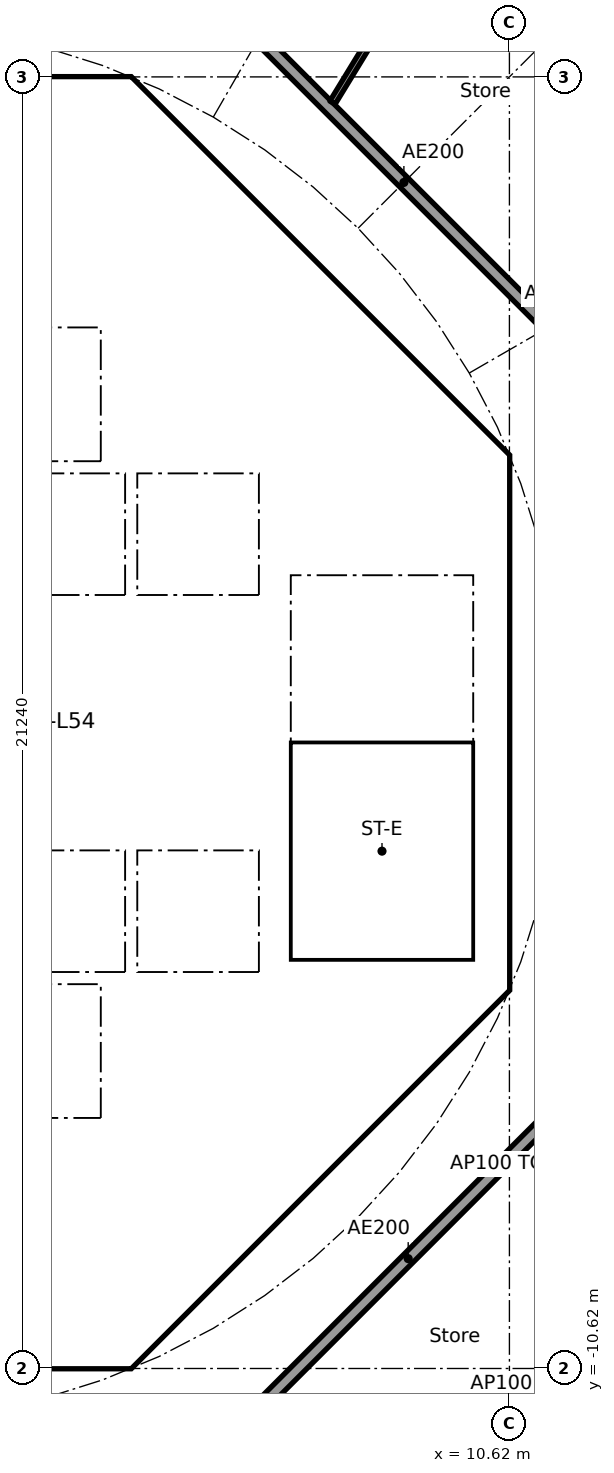
"""IFC4 building model, lengths in metres.
Left out: names, types, materials, properties, quantities, classifications, styles, units other than length and angle.
Written with IfcOpenShell. Run it as: python <this file> out.ifc"""

import sys

from ifc_helpers import new_model, si_unit, direction, frame, frame_2d, origin, place, context, subcontext, project, spatial, polyline, rectangle, outline, extrude, element, fill, save


model = new_model("IFC4")
c1 = context("Model", 3, precision=1e-05, world=origin(), true_north=direction((0.0, 1.0)))
c2 = subcontext(c1, "Body", "Model", "MODEL_VIEW")
j1 = project(units=[si_unit("LENGTHUNIT", "METRE"), si_unit("PLANEANGLEUNIT", "RADIAN")], contexts=[c1])
p1 = place(None, origin())
s1 = spatial("IfcSite", under=j1, at=p1, CompositionType="ELEMENT")
p2 = place(p1, origin())
s2 = spatial("IfcBuilding", under=s1, at=p2, CompositionType="ELEMENT")
p3 = place(p2, frame((0.0, 0.0, 212.2)))
s3 = spatial("IfcBuildingStorey", under=s2, at=p3, CompositionType="ELEMENT", Elevation=212.2)
p4 = place(p3, frame((9.988, 4.613, 0.0), z_axis=(0.0, 0.0, 1.0), x_axis=(-0.707106781187, 0.707106781187, 0.0)))
e1 = element("IfcWall", 1, at=p4, inside=s3, PredefinedType="SHEAR", context=c2, shape_type="SweptSolid", body=[
    extrude(rectangle(XDim=7.602, YDim=0.6, at=frame_2d((3.801, 0.0))), origin(), (0.0, 0.0, 1.0), 3.44),
])
p5 = place(p4, frame((3.201, 0.0, 0.0)))
e2 = element("IfcOpeningElement", 2, at=p5, cuts=e1, PredefinedType="OPENING", context=c2, shape_type="SweptSolid", body=[
    extrude(rectangle(XDim=1.2, YDim=2.1, at=frame_2d((0.6, 1.05))), frame((0.0, 0.31, 0.0), z_axis=(0.0, -1.0, 0.0), x_axis=(1.0, 0.0, 0.0)), (0.0, 0.0, 1.0), 0.62),
])
p6 = place(p3, frame((4.613, -9.988, 0.0), z_axis=(0.0, 0.0, 1.0), x_axis=(0.707106781187, 0.707106781187, 0.0)))
e3 = element("IfcWall", 3, at=p6, inside=s3, PredefinedType="SHEAR", context=c2, shape_type="SweptSolid", body=[
    extrude(rectangle(XDim=7.602, YDim=0.6, at=frame_2d((3.801, 0.0))), origin(), (0.0, 0.0, 1.0), 3.44),
])
p7 = place(p6, frame((3.201, 0.0, 0.0)))
e4 = element("IfcOpeningElement", 4, at=p7, cuts=e3, PredefinedType="OPENING", context=c2, shape_type="SweptSolid", body=[
    extrude(rectangle(XDim=1.2, YDim=2.1, at=frame_2d((0.6, 1.05))), frame((0.0, 0.31, 0.0), z_axis=(0.0, -1.0, 0.0), x_axis=(1.0, 0.0, 0.0)), (0.0, 0.0, 1.0), 0.62),
])
p8 = place(p3, frame((4.0, 4.3, 0.0), z_axis=(0.0, 0.0, 1.0), x_axis=(0.0, 1.0, 0.0)))
e5 = element("IfcWall", 5, at=p8, inside=s3, PredefinedType="SOLIDWALL", context=c2, shape_type="SweptSolid", body=[
    extrude(rectangle(XDim=2.2, YDim=0.2, at=frame_2d((1.1, 0.0))), origin(), (0.0, 0.0, 1.0), 3.44),
])
p9 = place(p8, frame((0.55, 0.0, 0.0)))
e6 = element("IfcOpeningElement", 6, at=p9, cuts=e5, PredefinedType="OPENING", context=c2, shape_type="SweptSolid", body=[
    extrude(rectangle(XDim=1.1, YDim=2.1, at=frame_2d((0.55, 1.05))), frame((0.0, 0.11, 0.0), z_axis=(0.0, -1.0, 0.0), x_axis=(1.0, 0.0, 0.0)), (0.0, 0.0, 1.0), 0.22),
])
p10 = place(p3, frame((-6.7, 2.0, 0.0), z_axis=(0.0, 0.0, 1.0), x_axis=(1.0, 0.0, 0.0)))
e7 = element("IfcWall", 7, at=p10, inside=s3, PredefinedType="SOLIDWALL", context=c2, shape_type="SweptSolid", body=[
    extrude(rectangle(XDim=13.4, YDim=0.2, at=frame_2d((6.7, 0.0))), origin(), (0.0, 0.0, 1.0), 3.44),
])
p11 = place(p10, frame((7.25, 0.0, 0.0)))
e8 = element("IfcOpeningElement", 8, at=p11, cuts=e7, PredefinedType="OPENING", context=c2, shape_type="SweptSolid", body=[
    extrude(rectangle(XDim=1.1, YDim=2.1, at=frame_2d((0.55, 1.05))), frame((0.0, 0.11, 0.0), z_axis=(0.0, -1.0, 0.0), x_axis=(1.0, 0.0, 0.0)), (0.0, 0.0, 1.0), 0.22),
])
p12 = place(p10, frame((9.45, 0.0, 0.0)))
e9 = element("IfcOpeningElement", 9, at=p12, cuts=e7, PredefinedType="OPENING", context=c2, shape_type="SweptSolid", body=[
    extrude(rectangle(XDim=1.1, YDim=2.1, at=frame_2d((0.55, 1.05))), frame((0.0, 0.11, 0.0), z_axis=(0.0, -1.0, 0.0), x_axis=(1.0, 0.0, 0.0)), (0.0, 0.0, 1.0), 0.22),
])
p13 = place(p10, frame((0.75, 0.0, 0.0)))
e10 = element("IfcOpeningElement", 10, at=p13, cuts=e7, PredefinedType="OPENING", context=c2, shape_type="SweptSolid", body=[
    extrude(rectangle(XDim=0.9, YDim=2.1, at=frame_2d((0.45, 1.05))), frame((0.0, 0.11, 0.0), z_axis=(0.0, -1.0, 0.0), x_axis=(1.0, 0.0, 0.0)), (0.0, 0.0, 1.0), 0.22),
])
p14 = place(p10, frame((4.05, 0.0, 0.0)))
e11 = element("IfcOpeningElement", 11, at=p14, cuts=e7, PredefinedType="OPENING", context=c2, shape_type="SweptSolid", body=[
    extrude(rectangle(XDim=0.9, YDim=2.1, at=frame_2d((0.45, 1.05))), frame((0.0, 0.11, 0.0), z_axis=(0.0, -1.0, 0.0), x_axis=(1.0, 0.0, 0.0)), (0.0, 0.0, 1.0), 0.22),
])
p15 = place(p3, frame((6.7, 4.0, 0.0), z_axis=(0.0, 0.0, 1.0), x_axis=(1.0, 0.0, 0.0)))
e12 = element("IfcWall", 12, at=p15, inside=s3, PredefinedType="SOLIDWALL", context=c2, shape_type="SweptSolid", body=[
    extrude(rectangle(XDim=3.325, YDim=0.2, at=frame_2d((1.662, 0.0))), origin(), (0.0, 0.0, 1.0), 3.44),
])
p16 = place(p15, frame((1.25, 0.0, 0.0)))
e13 = element("IfcOpeningElement", 13, at=p16, cuts=e12, PredefinedType="OPENING", context=c2, shape_type="SweptSolid", body=[
    extrude(rectangle(XDim=1.1, YDim=2.1, at=frame_2d((0.55, 1.05))), frame((0.0, 0.11, 0.0), z_axis=(0.0, -1.0, 0.0), x_axis=(1.0, 0.0, 0.0)), (0.0, 0.0, 1.0), 0.22),
])
p17 = place(p3, frame((4.0, 7.025, 0.0), z_axis=(0.0, 0.0, 1.0), x_axis=(0.0, 1.0, 0.0)))
e14 = element("IfcWall", 14, at=p17, inside=s3, PredefinedType="SOLIDWALL", context=c2, shape_type="SweptSolid", body=[
    extrude(rectangle(XDim=3.0, YDim=0.2, at=frame_2d((1.5, 0.0))), origin(), (0.0, 0.0, 1.0), 3.44),
])
p18 = place(p17, frame((0.925, 0.0, 0.0)))
e15 = element("IfcOpeningElement", 15, at=p18, cuts=e14, PredefinedType="OPENING", context=c2, shape_type="SweptSolid", body=[
    extrude(rectangle(XDim=1.1, YDim=2.1, at=frame_2d((0.55, 1.05))), frame((0.0, 0.11, 0.0), z_axis=(0.0, -1.0, 0.0), x_axis=(1.0, 0.0, 0.0)), (0.0, 0.0, 1.0), 0.22),
])
p19 = place(p3, frame((4.0, -10.025, 0.0), z_axis=(0.0, 0.0, 1.0), x_axis=(0.0, 1.0, 0.0)))
e16 = element("IfcWall", 16, at=p19, inside=s3, PredefinedType="SOLIDWALL", context=c2, shape_type="SweptSolid", body=[
    extrude(rectangle(XDim=3.0, YDim=0.2, at=frame_2d((1.5, 0.0))), origin(), (0.0, 0.0, 1.0), 3.44),
])
p20 = place(p19, frame((0.975, 0.0, 0.0)))
e17 = element("IfcOpeningElement", 17, at=p20, cuts=e16, PredefinedType="OPENING", context=c2, shape_type="SweptSolid", body=[
    extrude(rectangle(XDim=1.1, YDim=2.1, at=frame_2d((0.55, 1.05))), frame((0.0, 0.11, 0.0), z_axis=(0.0, -1.0, 0.0), x_axis=(1.0, 0.0, 0.0)), (0.0, 0.0, 1.0), 0.22),
])
p21 = place(p3, frame((4.0, -6.5, 0.0), z_axis=(0.0, 0.0, 1.0), x_axis=(0.0, 1.0, 0.0)))
e18 = element("IfcWall", 18, at=p21, inside=s3, PredefinedType="SOLIDWALL", context=c2, shape_type="SweptSolid", body=[
    extrude(rectangle(XDim=2.2, YDim=0.2, at=frame_2d((1.1, 0.0))), origin(), (0.0, 0.0, 1.0), 3.44),
])
p22 = place(p21, frame((0.55, 0.0, 0.0)))
e19 = element("IfcOpeningElement", 19, at=p22, cuts=e18, PredefinedType="OPENING", context=c2, shape_type="SweptSolid", body=[
    extrude(rectangle(XDim=1.1, YDim=2.1, at=frame_2d((0.55, 1.05))), frame((0.0, 0.11, 0.0), z_axis=(0.0, -1.0, 0.0), x_axis=(1.0, 0.0, 0.0)), (0.0, 0.0, 1.0), 0.22),
])
p23 = place(p3, frame((-6.7, -2.0, 0.0), z_axis=(0.0, 0.0, 1.0), x_axis=(1.0, 0.0, 0.0)))
e20 = element("IfcWall", 20, at=p23, inside=s3, PredefinedType="SOLIDWALL", context=c2, shape_type="SweptSolid", body=[
    extrude(rectangle(XDim=13.4, YDim=0.2, at=frame_2d((6.7, 0.0))), origin(), (0.0, 0.0, 1.0), 3.44),
])
p24 = place(p23, frame((5.05, 0.0, 0.0)))
e21 = element("IfcOpeningElement", 21, at=p24, cuts=e20, PredefinedType="OPENING", context=c2, shape_type="SweptSolid", body=[
    extrude(rectangle(XDim=1.1, YDim=2.1, at=frame_2d((0.55, 1.05))), frame((0.0, 0.11, 0.0), z_axis=(0.0, -1.0, 0.0), x_axis=(1.0, 0.0, 0.0)), (0.0, 0.0, 1.0), 0.22),
])
p25 = place(p23, frame((7.25, 0.0, 0.0)))
e22 = element("IfcOpeningElement", 22, at=p25, cuts=e20, PredefinedType="OPENING", context=c2, shape_type="SweptSolid", body=[
    extrude(rectangle(XDim=1.1, YDim=2.1, at=frame_2d((0.55, 1.05))), frame((0.0, 0.11, 0.0), z_axis=(0.0, -1.0, 0.0), x_axis=(1.0, 0.0, 0.0)), (0.0, 0.0, 1.0), 0.22),
])
p26 = place(p23, frame((1.85, 0.0, 0.0)))
e23 = element("IfcOpeningElement", 23, at=p26, cuts=e20, PredefinedType="OPENING", context=c2, shape_type="SweptSolid", body=[
    extrude(rectangle(XDim=0.9, YDim=2.1, at=frame_2d((0.45, 1.05))), frame((0.0, 0.11, 0.0), z_axis=(0.0, -1.0, 0.0), x_axis=(1.0, 0.0, 0.0)), (0.0, 0.0, 1.0), 0.22),
])
p27 = place(p3, origin())
e24 = element("IfcWall", 24, at=p27, inside=s3, PredefinedType="SHEAR", context=c2, shape_type="SweptSolid", body=[
    extrude(outline(polyline([(-4.152, -10.025), (4.152, -10.025), (4.401, -9.776), (4.825, -10.2), (4.401, -10.625), (-4.401, -10.625), (-4.825, -10.2), (-4.401, -9.776), (-4.152, -10.025)])), origin(), (0.0, 0.0, 1.0), 3.44),
])
p28 = place(p3, origin())
e25 = element("IfcWall", 25, at=p28, inside=s3, PredefinedType="SHEAR", context=c2, shape_type="SweptSolid", body=[
    extrude(outline(polyline([(-4.152, 10.025), (-4.401, 9.776), (-4.825, 10.2), (-4.401, 10.625), (4.401, 10.625), (4.825, 10.2), (4.401, 9.776), (4.152, 10.025), (-4.152, 10.025)])), origin(), (0.0, 0.0, 1.0), 3.44),
])
p29 = place(p3, origin())
e26 = element("IfcWall", 26, at=p29, inside=s3, PredefinedType="SHEAR", context=c2, shape_type="SweptSolid", body=[
    extrude(outline(polyline([(9.776, -4.401), (10.025, -4.152), (10.025, -3.801), (10.025, 4.152), (9.776, 4.401), (10.2, 4.825), (10.625, 4.401), (10.625, -4.401), (10.2, -4.825), (9.776, -4.401)])), origin(), (0.0, 0.0, 1.0), 3.44),
])
p30 = place(p3, origin())
e27 = element("IfcWall", 27, at=p30, inside=s3, PredefinedType="SOLIDWALL", context=c2, shape_type="SweptSolid", body=[
    extrude(outline(polyline([(-6.7, 4.3), (6.7, 4.3), (6.7, 2.1), (6.5, 2.1), (6.5, 4.1), (4.5, 4.1), (4.5, 2.1), (4.3, 2.1), (4.3, 4.1), (2.3, 4.1), (2.3, 2.1), (2.1, 2.1), (2.1, 4.1), (0.1, 4.1), (0.1, 2.1), (-0.1, 2.1), (-0.1, 4.1), (-4.3, 4.1), (-4.3, 2.1), (-4.5, 2.1), (-4.5, 4.1), (-6.5, 4.1), (-6.5, 2.1), (-6.7, 2.1), (-6.7, 4.3)])), origin(), (0.0, 0.0, 1.0), 3.44),
])
p31 = place(p3, origin())
e28 = element("IfcWall", 28, at=p31, inside=s3, PredefinedType="SOLIDWALL", context=c2, shape_type="SweptSolid", body=[
    extrude(outline(polyline([(-6.7, -2.1), (-6.5, -2.1), (-6.5, -4.1), (-2.3, -4.1), (-2.3, -2.1), (-2.1, -2.1), (-2.1, -4.1), (-0.1, -4.1), (-0.1, -2.1), (0.1, -2.1), (0.1, -4.1), (2.1, -4.1), (2.1, -2.1), (2.3, -2.1), (2.3, -4.1), (4.3, -4.1), (4.3, -2.1), (4.5, -2.1), (4.5, -4.1), (6.5, -4.1), (6.5, -2.1), (6.7, -2.1), (6.7, -4.3), (-6.7, -4.3), (-6.7, -2.1)])), origin(), (0.0, 0.0, 1.0), 3.44),
])
p32 = place(p3, origin())
e29 = element("IfcWall", 29, at=p32, inside=s3, PredefinedType="SOLIDWALL", context=c2, shape_type="SweptSolid", body=[
    extrude(outline(polyline([(4.1, -7.025), (-4.1, -7.025), (-4.1, -6.5), (4.1, -6.5), (4.1, -7.025)])), origin(), (0.0, 0.0, 1.0), 3.44),
])
p33 = place(p3, origin())
e30 = element("IfcWall", 30, at=p33, inside=s3, PredefinedType="SOLIDWALL", context=c2, shape_type="SweptSolid", body=[
    extrude(outline(polyline([(4.1, 6.5), (-4.1, 6.5), (-4.1, 7.025), (4.1, 7.025), (4.1, 6.5)])), origin(), (0.0, 0.0, 1.0), 3.44),
])
p34 = place(p3, origin())
e31 = element("IfcWall", 31, at=p34, inside=s3, PredefinedType="SOLIDWALL", context=c2, shape_type="SweptSolid", body=[
    extrude(outline(polyline([(7.025, -3.9), (6.7, -3.9), (6.7, 3.9), (7.025, 3.9), (7.025, -3.9)])), origin(), (0.0, 0.0, 1.0), 3.44),
])
p35 = place(p3, origin())
e32 = element("IfcWall", 32, at=p35, inside=s3, PredefinedType="SOLIDWALL", context=c2, shape_type="SweptSolid", body=[
    extrude(outline(polyline([(10.025, -4.1), (6.7, -4.1), (6.7, -3.9), (10.025, -3.9), (10.025, -4.1)])), origin(), (0.0, 0.0, 1.0), 3.44),
])
p36 = place(p3, frame((12.635, 5.134, 0.0), z_axis=(0.0, 0.0, 1.0), x_axis=(-0.707106781187, 0.707106781187, 0.0)))
e33 = element("IfcWall", 33, at=p36, inside=s3, PredefinedType="PARTITIONING", context=c2, shape_type="SweptSolid", body=[
    extrude(rectangle(XDim=10.609, YDim=0.2, at=frame_2d((5.305, 0.0))), origin(), (0.0, 0.0, 1.0), 3.44),
])
p37 = place(p3, frame((5.275, -12.494, 0.0), z_axis=(0.0, 0.0, 1.0), x_axis=(0.707106781187, 0.707106781187, 0.0)))
e34 = element("IfcWall", 34, at=p37, inside=s3, PredefinedType="PARTITIONING", context=c2, shape_type="SweptSolid", body=[
    extrude(rectangle(XDim=10.409, YDim=0.2, at=frame_2d((5.205, 0.0))), origin(), (0.0, 0.0, 1.0), 3.44),
])
p38 = place(p3, frame((12.759, 10.443, 0.0), z_axis=(0.0, 0.0, 1.0), x_axis=(-0.642225196965, 0.766516011825, 0.0)))
e35 = element("IfcWall", 35, at=p38, inside=s3, PredefinedType="PARTITIONING", context=c2, shape_type="SweptSolid", body=[
    extrude(rectangle(XDim=4.361, YDim=0.1, at=frame_2d((2.18, 0.0))), origin(), (0.0, 0.0, 1.0), 2.837),
])
p39 = place(p3, frame((7.71, 10.197, 0.0), z_axis=(0.0, 0.0, 1.0), x_axis=(0.521477621335, 0.853264959111, 0.0)))
e36 = element("IfcWall", 36, at=p39, inside=s3, PredefinedType="PARTITIONING", context=c2, shape_type="SweptSolid", body=[
    extrude(rectangle(XDim=8.941, YDim=0.1, at=frame_2d((4.471, 0.0))), origin(), (0.0, 0.0, 1.0), 2.762),
])
p40 = place(p39, frame((6.121, 0.0, 0.0)))
e37 = element("IfcOpeningElement", 37, at=p40, cuts=e36, PredefinedType="OPENING", context=c2, shape_type="SweptSolid", body=[
    extrude(rectangle(XDim=0.9, YDim=2.1, at=frame_2d((0.45, 1.05))), frame((0.0, 0.06, 0.0), z_axis=(0.0, -1.0, 0.0), x_axis=(1.0, 0.0, 0.0)), (0.0, 0.0, 1.0), 0.12),
])
p41 = place(p3, frame((10.753, -11.132, 0.0), z_axis=(0.0, 0.0, 1.0), x_axis=(0.647001799757, 0.762488472773, 0.0)))
e38 = element("IfcWall", 38, at=p41, inside=s3, PredefinedType="PARTITIONING", context=c2, shape_type="SweptSolid", body=[
    extrude(rectangle(XDim=6.359, YDim=0.1, at=frame_2d((3.179, 0.0))), origin(), (0.0, 0.0, 1.0), 2.837),
])
p42 = place(p41, frame((2.754, 0.0, 0.0)))
e39 = element("IfcOpeningElement", 39, at=p42, cuts=e38, PredefinedType="OPENING", context=c2, shape_type="SweptSolid", body=[
    extrude(rectangle(XDim=0.9, YDim=2.1, at=frame_2d((0.45, 1.05))), frame((0.0, 0.06, 0.0), z_axis=(0.0, -1.0, 0.0), x_axis=(1.0, 0.0, 0.0)), (0.0, 0.0, 1.0), 0.12),
])
p43 = place(p12, origin())
e40 = element("IfcDoor", 40, at=p43, inside=s3, OperationType="DOUBLE_DOOR_SLIDING", PredefinedType="DOOR", context=c2, shape_type="SweptSolid", body=[
    extrude(rectangle(XDim=1.1, YDim=2.1, at=frame_2d((0.55, 1.05))), frame((0.0, 0.025, 0.0), z_axis=(0.0, -1.0, 0.0), x_axis=(1.0, 0.0, 0.0)), (0.0, 0.0, 1.0), 0.05),
])
fill(e9, e40)
p44 = place(p9, origin())
e41 = element("IfcDoor", 41, at=p44, inside=s3, OperationType="DOUBLE_DOOR_SLIDING", PredefinedType="DOOR", context=c2, shape_type="SweptSolid", body=[
    extrude(rectangle(XDim=1.1, YDim=2.1, at=frame_2d((0.55, 1.05))), frame((0.0, 0.025, 0.0), z_axis=(0.0, -1.0, 0.0), x_axis=(1.0, 0.0, 0.0)), (0.0, 0.0, 1.0), 0.05),
])
fill(e6, e41)
p45 = place(p22, origin())
e42 = element("IfcDoor", 42, at=p45, inside=s3, OperationType="DOUBLE_DOOR_SLIDING", PredefinedType="DOOR", context=c2, shape_type="SweptSolid", body=[
    extrude(rectangle(XDim=1.1, YDim=2.1, at=frame_2d((0.55, 1.05))), frame((0.0, 0.025, 0.0), z_axis=(0.0, -1.0, 0.0), x_axis=(1.0, 0.0, 0.0)), (0.0, 0.0, 1.0), 0.05),
])
fill(e19, e42)
p46 = place(p16, frame((1.1, 0.0, 0.0), x_axis=(-1.0, 0.0, 0.0)))
e43 = element("IfcDoor", 43, at=p46, inside=s3, OperationType="SINGLE_SWING_LEFT", PredefinedType="DOOR", context=c2, shape_type="SweptSolid", body=[
    extrude(rectangle(XDim=1.1, YDim=2.1, at=frame_2d((0.55, 1.05))), frame((0.0, 0.025, 0.0), z_axis=(0.0, -1.0, 0.0), x_axis=(1.0, 0.0, 0.0)), (0.0, 0.0, 1.0), 0.05),
])
fill(e13, e43)
p47 = place(p18, origin())
e44 = element("IfcDoor", 44, at=p47, inside=s3, OperationType="SINGLE_SWING_RIGHT", PredefinedType="DOOR", context=c2, shape_type="SweptSolid", body=[
    extrude(rectangle(XDim=1.1, YDim=2.1, at=frame_2d((0.55, 1.05))), frame((0.0, 0.025, 0.0), z_axis=(0.0, -1.0, 0.0), x_axis=(1.0, 0.0, 0.0)), (0.0, 0.0, 1.0), 0.05),
])
fill(e15, e44)
p48 = place(p20, origin())
e45 = element("IfcDoor", 45, at=p48, inside=s3, OperationType="SINGLE_SWING_LEFT", PredefinedType="DOOR", context=c2, shape_type="SweptSolid", body=[
    extrude(rectangle(XDim=1.1, YDim=2.1, at=frame_2d((0.55, 1.05))), frame((0.0, 0.025, 0.0), z_axis=(0.0, -1.0, 0.0), x_axis=(1.0, 0.0, 0.0)), (0.0, 0.0, 1.0), 0.05),
])
fill(e17, e45)
p49 = place(p5, origin())
e46 = element("IfcDoor", 46, at=p49, inside=s3, OperationType="SINGLE_SWING_LEFT", PredefinedType="DOOR", context=c2, shape_type="SweptSolid", body=[
    extrude(rectangle(XDim=1.2, YDim=2.1, at=frame_2d((0.6, 1.05))), frame((0.0, 0.025, 0.0), z_axis=(0.0, -1.0, 0.0), x_axis=(1.0, 0.0, 0.0)), (0.0, 0.0, 1.0), 0.05),
])
fill(e2, e46)
p50 = place(p7, origin())
e47 = element("IfcDoor", 47, at=p50, inside=s3, OperationType="SINGLE_SWING_LEFT", PredefinedType="DOOR", context=c2, shape_type="SweptSolid", body=[
    extrude(rectangle(XDim=1.2, YDim=2.1, at=frame_2d((0.6, 1.05))), frame((0.0, 0.025, 0.0), z_axis=(0.0, -1.0, 0.0), x_axis=(1.0, 0.0, 0.0)), (0.0, 0.0, 1.0), 0.05),
])
fill(e4, e47)
save(model, sys.argv[1])
